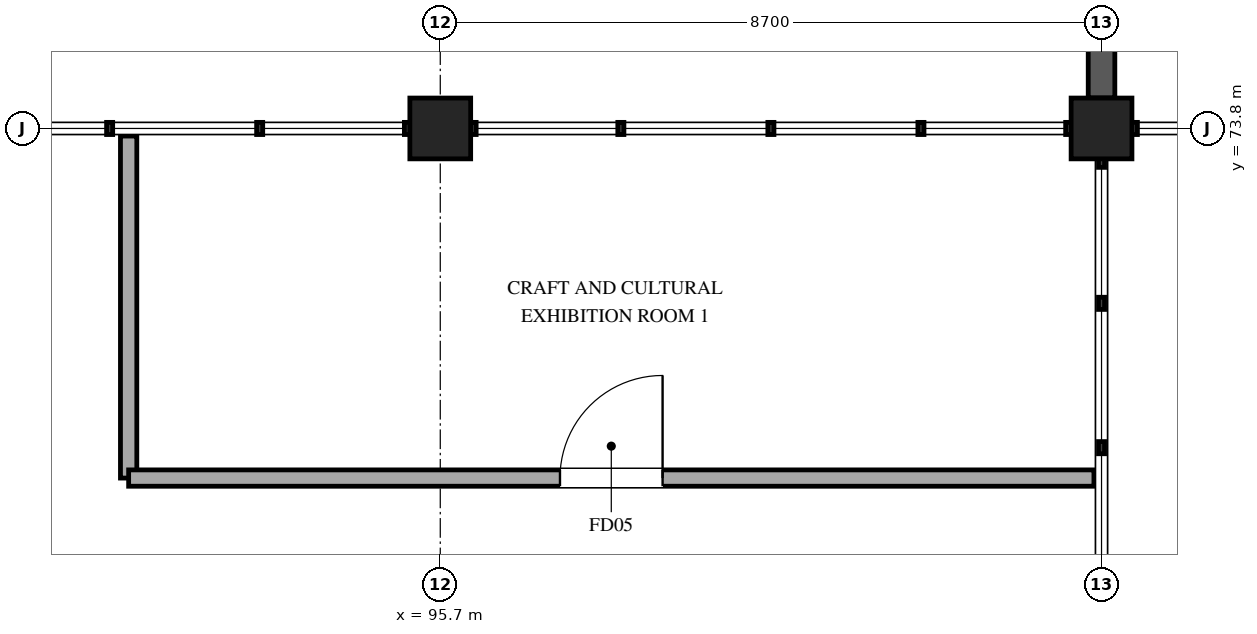
"""IFC4 building model, lengths in metres.
Left out: names, types, materials, properties, quantities, classifications, styles, units other than length and angle.
Written with IfcOpenShell. Run it as: python <this file> out.ifc"""

import sys

from ifc_helpers import new_model, si_unit, direction, frame, frame_2d, origin, origin_2d, place, context, subcontext, project, spatial, rectangle, extrude, element, fill, save


model = new_model("IFC4")
c1 = context("Model", 3, precision=1e-05, world=origin(), true_north=direction((0.0, 1.0)))
c2 = subcontext(c1, "Body", "Model", "MODEL_VIEW")
j1 = project(units=[si_unit("LENGTHUNIT", "METRE"), si_unit("PLANEANGLEUNIT", "RADIAN")], contexts=[c1])
p1 = place(None, origin())
s1 = spatial("IfcSite", under=j1, at=p1, CompositionType="ELEMENT")
p2 = place(p1, origin())
s2 = spatial("IfcBuilding", under=s1, at=p2, CompositionType="ELEMENT")
p3 = place(p2, frame((0.0, 0.0, 21.6)))
s3 = spatial("IfcBuildingStorey", under=s2, at=p3, CompositionType="ELEMENT", Elevation=21.6)
for number, where, z_axis, x_axis in (
    (1, (95.7, 73.8, 0.0), (0.0, 0.0, 1.0), (1.0, 0.0, 0.0)),
    (2, (104.4, 73.8, 0.0), (0.0, 0.0, 1.0), (1.0, 0.0, 0.0)),
):
    element("IfcColumn", number, at=place(p3, frame(where, z_axis=z_axis, x_axis=x_axis)), inside=s3, PredefinedType="COLUMN", context=c2, shape_type="SweptSolid", body=[
        extrude(rectangle(XDim=0.8, YDim=0.8, at=origin_2d()), origin(), (0.0, 0.0, 1.0), 5.1),
    ])
p4 = place(p3, frame((104.4, 74.202, 0.0), z_axis=(0.0, 0.0, 1.0), x_axis=(0.0, 1.0, 0.0)))
e3 = element("IfcWall", 3, at=p4, inside=s3, PredefinedType="STANDARD", context=c2, shape_type="SweptSolid", body=[
    extrude(rectangle(XDim=7.596, YDim=0.35, at=frame_2d((3.798, 0.0))), origin(), (0.0, 0.0, 1.0), 4.79),
])
p5 = place(p4, frame((1.998, 0.0, 0.85)))
e4 = element("IfcOpeningElement", 4, at=p5, cuts=e3, PredefinedType="OPENING", context=c2, shape_type="SweptSolid", body=[
    extrude(rectangle(XDim=3.6, YDim=2.45, at=frame_2d((1.8, 1.225))), frame((0.0, 0.185, 0.0), z_axis=(0.0, -1.0, 0.0), x_axis=(1.0, 0.0, 0.0)), (0.0, 0.0, 1.0), 0.37),
])
p6 = place(p3, frame((91.6, 73.7, 0.0), z_axis=(0.0, 0.0, 1.0), x_axis=(0.0, -1.0, 0.0)))
e5 = element("IfcWall", 5, at=p6, inside=s3, PredefinedType="PARTITIONING", context=c2, shape_type="SweptSolid", body=[
    extrude(rectangle(XDim=4.5, YDim=0.215, at=frame_2d((2.25, 0.0))), origin(), (0.0, 0.0, 1.0), 4.26),
])
p7 = place(p3, frame((91.6, 69.2, 0.0), z_axis=(0.0, 0.0, 1.0), x_axis=(1.0, 0.0, 0.0)))
e6 = element("IfcWall", 6, at=p7, inside=s3, PredefinedType="PARTITIONING", context=c2, shape_type="SweptSolid", body=[
    extrude(rectangle(XDim=12.7, YDim=0.215, at=frame_2d((6.35, 0.0))), origin(), (0.0, 0.0, 1.0), 4.06),
])
p8 = place(p7, frame((5.675, 0.0, 0.0)))
e7 = element("IfcOpeningElement", 7, at=p8, cuts=e6, PredefinedType="OPENING", context=c2, shape_type="SweptSolid", body=[
    extrude(rectangle(XDim=1.35, YDim=2.2, at=frame_2d((0.675, 1.1))), frame((0.0, 0.118, 0.0), z_axis=(0.0, -1.0, 0.0), x_axis=(1.0, 0.0, 0.0)), (0.0, 0.0, 1.0), 0.235),
])
p9 = place(p8, origin())
e8 = element("IfcDoor", 8, at=p9, inside=s3, OperationType="SINGLE_SWING_RIGHT", PredefinedType="DOOR", context=c2, shape_type="SweptSolid", body=[
    extrude(rectangle(XDim=1.35, YDim=2.2, at=frame_2d((0.675, 1.1))), frame((0.0, 0.025, 0.0), z_axis=(0.0, -1.0, 0.0), x_axis=(1.0, 0.0, 0.0)), (0.0, 0.0, 1.0), 0.05),
])
fill(e7, e8)
save(model, sys.argv[1])
